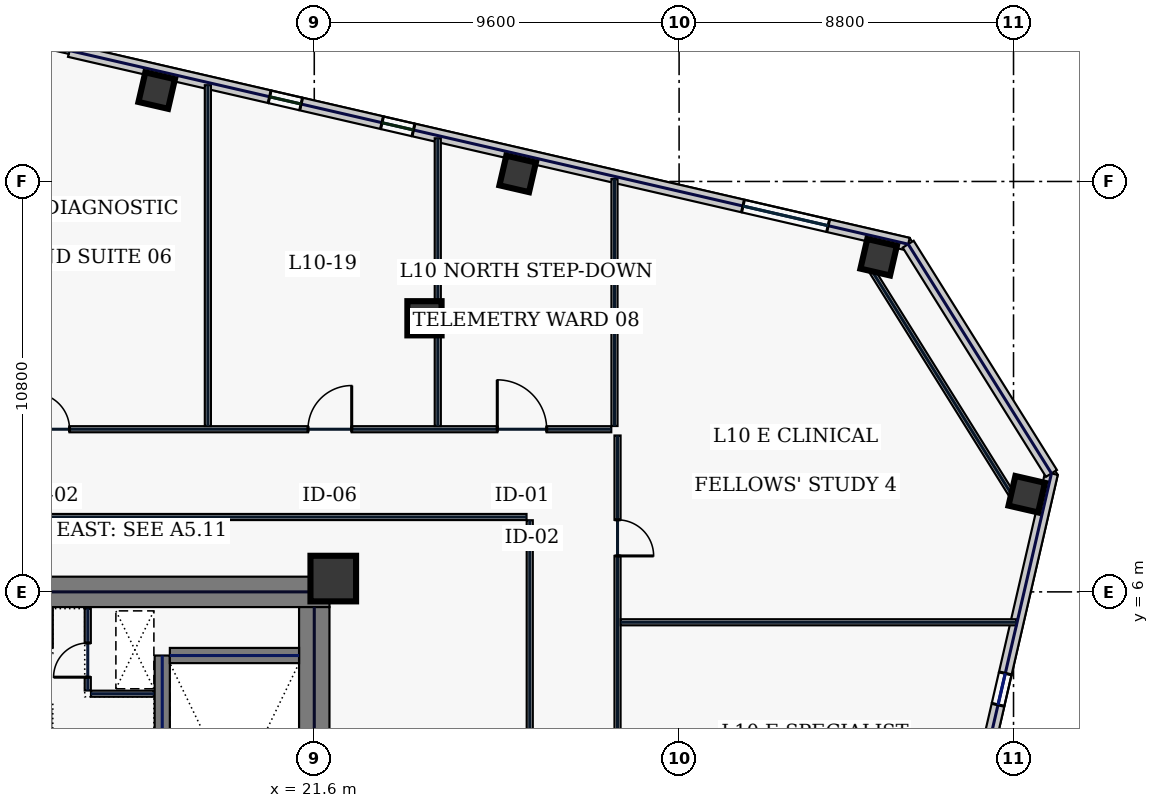
"""IFC4 building model, lengths in metres.
Left out: names, types, materials, properties, quantities, classifications, styles, units other than length and angle.
Written with IfcOpenShell. Run it as: python <this file> out.ifc"""

import sys

from ifc_helpers import new_model, si_unit, direction, frame, frame_2d, origin, origin_2d, place, context, subcontext, project, spatial, rectangle, hollow_rectangle, extrude, element, fill, save


model = new_model("IFC4")
c1 = context("Model", 3, precision=1e-05, world=origin(), true_north=direction((0.0, 1.0)))
c2 = subcontext(c1, "Body", "Model", "MODEL_VIEW")
j1 = project(units=[si_unit("LENGTHUNIT", "METRE"), si_unit("PLANEANGLEUNIT", "RADIAN")], contexts=[c1])
p1 = place(None, origin())
s1 = spatial("IfcSite", under=j1, at=p1, CompositionType="ELEMENT")
p2 = place(p1, origin())
s2 = spatial("IfcBuilding", under=s1, at=p2, CompositionType="ELEMENT")
p3 = place(p2, frame((0.0, 0.0, 51.4)))
s3 = spatial("IfcBuildingStorey", under=s2, at=p3, CompositionType="ELEMENT", Elevation=51.4)
p4 = place(p3, frame((10.4, 6.0, 0.0), z_axis=(0.0, 0.0, 1.0), x_axis=(1.0, 0.0, 0.0)))
e1 = element("IfcWall", 1, at=p4, inside=s3, PredefinedType="SHEAR", context=c2, shape_type="SweptSolid", body=[
    extrude(rectangle(XDim=11.6, YDim=0.8, at=frame_2d((5.8, 0.0))), origin(), (0.0, 0.0, 1.0), 3.74),
])
p5 = place(p3, frame((21.6, -5.6, 0.0), z_axis=(0.0, 0.0, 1.0), x_axis=(0.0, 1.0, 0.0)))
e2 = element("IfcWall", 2, at=p5, inside=s3, PredefinedType="SHEAR", context=c2, shape_type="SweptSolid", body=[
    extrude(rectangle(XDim=11.2, YDim=0.8, at=frame_2d((5.6, 0.0))), origin(), (0.0, 0.0, 1.0), 3.74),
])
p6 = place(p3, frame((17.6, -4.325, 0.0), z_axis=(0.0, 0.0, 1.0), x_axis=(0.0, 1.0, 0.0)))
e3 = element("IfcWall", 3, at=p6, inside=s3, PredefinedType="SHEAR", context=c2, shape_type="SweptSolid", body=[
    extrude(rectangle(XDim=8.65, YDim=0.4, at=frame_2d((4.325, 0.0))), origin(), (0.0, 0.0, 1.0), 3.74),
])
p7 = place(p6, frame((0.25, 0.0, 0.0)))
e4 = element("IfcOpeningElement", 4, at=p7, cuts=e3, PredefinedType="OPENING", context=c2, shape_type="SweptSolid", body=[
    extrude(rectangle(XDim=1.1, YDim=2.2, at=frame_2d((0.55, 1.1))), frame((0.0, 0.21, 0.0), z_axis=(0.0, -1.0, 0.0), x_axis=(1.0, 0.0, 0.0)), (0.0, 0.0, 1.0), 0.42),
])
p8 = place(p3, frame((17.8, 4.325, 0.0), z_axis=(0.0, 0.0, 1.0), x_axis=(1.0, 0.0, 0.0)))
e5 = element("IfcWall", 5, at=p8, inside=s3, PredefinedType="SHEAR", context=c2, shape_type="SweptSolid", body=[
    extrude(rectangle(XDim=3.4, YDim=0.4, at=frame_2d((1.7, 0.0))), origin(), (0.0, 0.0, 1.0), 3.74),
])
p9 = place(p3, frame((22.1, 6.35, 0.0), z_axis=(0.0, 0.0, 1.0), x_axis=(1.0, 0.0, 0.0)))
e6 = element("IfcColumn", 6, at=p9, inside=s3, PredefinedType="COLUMN", context=c2, shape_type="SweptSolid", body=[
    extrude(hollow_rectangle(XDim=1.2, YDim=1.2, WallThickness=0.05, at=origin_2d()), origin(), (0.0, 0.0, 1.0), 3.74),
])
p10 = place(p3, frame((24.5, 13.2, 0.0), z_axis=(0.0, 0.0, 1.0), x_axis=(1.0, 0.0, 0.0)))
e7 = element("IfcColumn", 7, at=p10, inside=s3, PredefinedType="COLUMN", context=c2, shape_type="SweptSolid", body=[
    extrude(hollow_rectangle(XDim=0.9, YDim=0.9, WallThickness=0.04, at=origin_2d()), origin(), (0.0, 0.0, 1.0), 3.74),
])
for number, where, z_axis, x_axis in (
    (8, (36.451, 14.806, 0.0), (0.0, 0.0, 1.0), (0.974, -0.225, 0.0)),
    (9, (26.952, 16.999, 0.0), (0.0, 0.0, 1.0), (0.974, -0.225, 0.0)),
    (10, (17.454, 19.192, 0.0), (0.0, 0.0, 1.0), (0.974, -0.225, 0.0)),
    (11, (40.348, 8.57, 0.0), (0.0, 0.0, 1.0), (0.974, -0.225, 0.0)),
):
    element("IfcColumn", number, at=place(p3, frame(where, z_axis=z_axis, x_axis=x_axis)), inside=s3, PredefinedType="COLUMN", context=c2, shape_type="SweptSolid", body=[
        extrude(hollow_rectangle(XDim=0.8, YDim=0.8, WallThickness=0.036, at=origin_2d()), origin(), (0.0, 0.0, 1.0), 3.74),
    ])
p11 = place(p3, frame((37.229, 15.15, 0.0), z_axis=(0.0, 0.0, 1.0), x_axis=(-0.97436993772, 0.224951604723, 0.0)))
e12 = element("IfcWall", 12, at=p11, inside=s3, PredefinedType="STANDARD", context=c2, shape_type="SweptSolid", body=[
    extrude(rectangle(XDim=22.651, YDim=0.34, at=frame_2d((11.326, 0.0))), origin(), (0.0, 0.0, 1.0), 3.74),
])
p12 = place(p11, frame((16.395, 0.0, 0.77)))
e13 = element("IfcOpeningElement", 13, at=p12, cuts=e12, PredefinedType="OPENING", context=c2, shape_type="SweptSolid", body=[
    extrude(rectangle(XDim=0.85, YDim=1.85, at=frame_2d((0.425, 0.925))), frame((0.0, 0.18, 0.0), z_axis=(0.0, -1.0, 0.0), x_axis=(1.0, 0.0, 0.0)), (0.0, 0.0, 1.0), 0.36),
])
p13 = place(p11, frame((13.361, 0.0, 0.77)))
e14 = element("IfcOpeningElement", 14, at=p13, cuts=e12, PredefinedType="OPENING", context=c2, shape_type="SweptSolid", body=[
    extrude(rectangle(XDim=0.85, YDim=1.85, at=frame_2d((0.425, 0.925))), frame((0.0, 0.18, 0.0), z_axis=(0.0, -1.0, 0.0), x_axis=(1.0, 0.0, 0.0)), (0.0, 0.0, 1.0), 0.36),
])
p14 = place(p11, frame((2.162, 0.0, 0.77)))
e15 = element("IfcOpeningElement", 15, at=p14, cuts=e12, PredefinedType="OPENING", context=c2, shape_type="SweptSolid", body=[
    extrude(rectangle(XDim=2.3, YDim=2.1, at=frame_2d((1.15, 1.05))), frame((0.0, 0.18, 0.0), z_axis=(0.0, -1.0, 0.0), x_axis=(1.0, 0.0, 0.0)), (0.0, 0.0, 1.0), 0.36),
])
p15 = place(p3, frame((31.82, -30.637, 0.0), z_axis=(0.0, 0.0, 1.0), x_axis=(0.224949969076, 0.974370315338, 0.0)))
e16 = element("IfcWall", 16, at=p15, inside=s3, PredefinedType="STANDARD", context=c2, shape_type="SweptSolid", body=[
    extrude(rectangle(XDim=40.8, YDim=0.34, at=frame_2d((20.4, 0.0))), origin(), (0.0, 0.0, 1.0), 3.74),
])
p16 = place(p15, frame((4.3, 0.0, 0.58)))
e17 = element("IfcOpeningElement", 17, at=p16, cuts=e16, PredefinedType="OPENING", context=c2, shape_type="SweptSolid", body=[
    extrude(rectangle(XDim=1.6, YDim=2.3, at=frame_2d((0.8, 1.15))), frame((0.0, 0.18, 0.0), z_axis=(0.0, -1.0, 0.0), x_axis=(1.0, 0.0, 0.0)), (0.0, 0.0, 1.0), 0.36),
])
p17 = place(p15, frame((14.5, 0.0, 0.58)))
e18 = element("IfcOpeningElement", 18, at=p17, cuts=e16, PredefinedType="OPENING", context=c2, shape_type="SweptSolid", body=[
    extrude(rectangle(XDim=1.6, YDim=2.3, at=frame_2d((0.8, 1.15))), frame((0.0, 0.18, 0.0), z_axis=(0.0, -1.0, 0.0), x_axis=(1.0, 0.0, 0.0)), (0.0, 0.0, 1.0), 0.36),
])
p18 = place(p15, frame((24.35, 0.0, 0.75)))
e19 = element("IfcOpeningElement", 19, at=p18, cuts=e16, PredefinedType="OPENING", context=c2, shape_type="SweptSolid", body=[
    extrude(rectangle(XDim=0.85, YDim=1.85, at=frame_2d((0.425, 0.925))), frame((0.0, 0.18, 0.0), z_axis=(0.0, -1.0, 0.0), x_axis=(1.0, 0.0, 0.0)), (0.0, 0.0, 1.0), 0.36),
])
p19 = place(p15, frame((34.55, 0.0, 0.75)))
e20 = element("IfcOpeningElement", 20, at=p19, cuts=e16, PredefinedType="OPENING", context=c2, shape_type="SweptSolid", body=[
    extrude(rectangle(XDim=0.85, YDim=1.85, at=frame_2d((0.425, 0.925))), frame((0.0, 0.18, 0.0), z_axis=(0.0, -1.0, 0.0), x_axis=(1.0, 0.0, 0.0)), (0.0, 0.0, 1.0), 0.36),
])
p20 = place(p3, frame((40.998, 9.117, 0.0), z_axis=(0.0, 0.0, 1.0), x_axis=(-0.529921811158, 0.848046504656, 0.0)))
e21 = element("IfcWall", 21, at=p20, inside=s3, PredefinedType="STANDARD", context=c2, shape_type="SweptSolid", body=[
    extrude(rectangle(XDim=7.113, YDim=0.34, at=frame_2d((3.557, 0.0))), origin(), (0.0, 0.0, 1.0), 3.74),
])
p21 = place(p3, frame((15.64, 3.405, 0.0), z_axis=(0.0, 0.0, 1.0), x_axis=(0.0, 1.0, 0.0)))
e22 = element("IfcWall", 22, at=p21, inside=s3, PredefinedType="PARTITIONING", context=c2, shape_type="SweptSolid", body=[
    extrude(rectangle(XDim=2.155, YDim=0.16, at=frame_2d((1.078, 0.0))), origin(), (0.0, 0.0, 1.0), 3.74),
])
p22 = place(p21, frame((0.35, 0.0, 0.0)))
e23 = element("IfcOpeningElement", 23, at=p22, cuts=e22, PredefinedType="OPENING", context=c2, shape_type="SweptSolid", body=[
    extrude(rectangle(XDim=0.9, YDim=2.2, at=frame_2d((0.45, 1.1))), frame((0.0, 0.09, 0.0), z_axis=(0.0, -1.0, 0.0), x_axis=(1.0, 0.0, 0.0)), (0.0, 0.0, 1.0), 0.18),
])
p23 = place(p3, frame((15.725, 3.32, 0.0), z_axis=(0.0, 0.0, 1.0), x_axis=(1.0, 0.0, 0.0)))
e24 = element("IfcWall", 24, at=p23, inside=s3, PredefinedType="PARTITIONING", context=c2, shape_type="SweptSolid", body=[
    extrude(rectangle(XDim=1.655, YDim=0.16, at=frame_2d((0.827, 0.0))), origin(), (0.0, 0.0, 1.0), 3.74),
])
p24 = place(p3, frame((40.06, 8.389, 0.0), z_axis=(0.0, 0.0, 1.0), x_axis=(-0.529927317139, 0.848043064089, 0.0)))
e25 = element("IfcWall", 25, at=p24, inside=s3, PredefinedType="PARTITIONING", context=c2, shape_type="SweptSolid", body=[
    extrude(rectangle(XDim=7.354, YDim=0.16, at=frame_2d((3.677, 0.0))), origin(), (0.0, 0.0, 1.0), 3.74),
])
p25 = place(p3, frame((-29.415, 10.28, 0.0), z_axis=(0.0, 0.0, 1.0), x_axis=(1.0, 0.0, 0.0)))
e26 = element("IfcWall", 26, at=p25, inside=s3, PredefinedType="PARTITIONING", context=c2, shape_type="SweptSolid", body=[
    extrude(rectangle(XDim=58.83, YDim=0.16, at=frame_2d((29.415, 0.0))), origin(), (0.0, 0.0, 1.0), 3.74),
])
p26 = place(p25, frame((1.869, 0.0, 0.0)))
e27 = element("IfcOpeningElement", 27, at=p26, cuts=e26, PredefinedType="OPENING", context=c2, shape_type="SweptSolid", body=[
    extrude(rectangle(XDim=1.3, YDim=2.2, at=frame_2d((0.65, 1.1))), frame((0.0, 0.09, 0.0), z_axis=(0.0, -1.0, 0.0), x_axis=(1.0, 0.0, 0.0)), (0.0, 0.0, 1.0), 0.18),
])
p27 = place(p25, frame((6.897, 0.0, 0.0)))
e28 = element("IfcOpeningElement", 28, at=p27, cuts=e26, PredefinedType="OPENING", context=c2, shape_type="SweptSolid", body=[
    extrude(rectangle(XDim=1.3, YDim=2.2, at=frame_2d((0.65, 1.1))), frame((0.0, 0.09, 0.0), z_axis=(0.0, -1.0, 0.0), x_axis=(1.0, 0.0, 0.0)), (0.0, 0.0, 1.0), 0.18),
])
p28 = place(p25, frame((12.417, 0.0, 0.0)))
e29 = element("IfcOpeningElement", 29, at=p28, cuts=e26, PredefinedType="OPENING", context=c2, shape_type="SweptSolid", body=[
    extrude(rectangle(XDim=0.95, YDim=2.2, at=frame_2d((0.475, 1.1))), frame((0.0, 0.09, 0.0), z_axis=(0.0, -1.0, 0.0), x_axis=(1.0, 0.0, 0.0)), (0.0, 0.0, 1.0), 0.18),
])
p29 = place(p25, frame((18.545, 0.0, 0.0)))
e30 = element("IfcOpeningElement", 30, at=p29, cuts=e26, PredefinedType="OPENING", context=c2, shape_type="SweptSolid", body=[
    extrude(rectangle(XDim=0.95, YDim=2.2, at=frame_2d((0.475, 1.1))), frame((0.0, 0.09, 0.0), z_axis=(0.0, -1.0, 0.0), x_axis=(1.0, 0.0, 0.0)), (0.0, 0.0, 1.0), 0.18),
])
p30 = place(p25, frame((26.35, 0.0, 0.0)))
e31 = element("IfcOpeningElement", 31, at=p30, cuts=e26, PredefinedType="OPENING", context=c2, shape_type="SweptSolid", body=[
    extrude(rectangle(XDim=1.3, YDim=2.2, at=frame_2d((0.65, 1.1))), frame((0.0, 0.09, 0.0), z_axis=(0.0, -1.0, 0.0), x_axis=(1.0, 0.0, 0.0)), (0.0, 0.0, 1.0), 0.18),
])
p31 = place(p25, frame((35.125, 0.0, 0.0)))
e32 = element("IfcOpeningElement", 32, at=p31, cuts=e26, PredefinedType="OPENING", context=c2, shape_type="SweptSolid", body=[
    extrude(rectangle(XDim=0.95, YDim=2.2, at=frame_2d((0.475, 1.1))), frame((0.0, 0.09, 0.0), z_axis=(0.0, -1.0, 0.0), x_axis=(1.0, 0.0, 0.0)), (0.0, 0.0, 1.0), 0.18),
])
p32 = place(p25, frame((43.625, 0.0, 0.0)))
e33 = element("IfcOpeningElement", 33, at=p32, cuts=e26, PredefinedType="OPENING", context=c2, shape_type="SweptSolid", body=[
    extrude(rectangle(XDim=0.95, YDim=2.2, at=frame_2d((0.475, 1.1))), frame((0.0, 0.09, 0.0), z_axis=(0.0, -1.0, 0.0), x_axis=(1.0, 0.0, 0.0)), (0.0, 0.0, 1.0), 0.18),
])
p33 = place(p25, frame((50.85, 0.0, 0.0)))
e34 = element("IfcOpeningElement", 34, at=p33, cuts=e26, PredefinedType="OPENING", context=c2, shape_type="SweptSolid", body=[
    extrude(rectangle(XDim=1.15, YDim=2.2, at=frame_2d((0.575, 1.1))), frame((0.0, 0.09, 0.0), z_axis=(0.0, -1.0, 0.0), x_axis=(1.0, 0.0, 0.0)), (0.0, 0.0, 1.0), 0.18),
])
p34 = place(p25, frame((55.831, 0.0, 0.0)))
e35 = element("IfcOpeningElement", 35, at=p34, cuts=e26, PredefinedType="OPENING", context=c2, shape_type="SweptSolid", body=[
    extrude(rectangle(XDim=1.3, YDim=2.2, at=frame_2d((0.65, 1.1))), frame((0.0, 0.09, 0.0), z_axis=(0.0, -1.0, 0.0), x_axis=(1.0, 0.0, 0.0)), (0.0, 0.0, 1.0), 0.18),
])
p35 = place(p3, frame((29.58, 10.115, 0.0), z_axis=(0.0, 0.0, 1.0), x_axis=(0.0, -1.0, 0.0)))
e36 = element("IfcWall", 36, at=p35, inside=s3, PredefinedType="PARTITIONING", context=c2, shape_type="SweptSolid", body=[
    extrude(rectangle(XDim=20.13, YDim=0.16, at=frame_2d((10.065, 0.0))), origin(), (0.0, 0.0, 1.0), 3.74),
])
p36 = place(p35, frame((17.181, 0.0, 0.0)))
e37 = element("IfcOpeningElement", 37, at=p36, cuts=e36, PredefinedType="OPENING", context=c2, shape_type="SweptSolid", body=[
    extrude(rectangle(XDim=0.95, YDim=2.2, at=frame_2d((0.475, 1.1))), frame((0.0, 0.09, 0.0), z_axis=(0.0, -1.0, 0.0), x_axis=(1.0, 0.0, 0.0)), (0.0, 0.0, 1.0), 0.18),
])
p37 = place(p35, frame((12.95, 0.0, 0.0)))
e38 = element("IfcOpeningElement", 38, at=p37, cuts=e36, PredefinedType="OPENING", context=c2, shape_type="SweptSolid", body=[
    extrude(rectangle(XDim=0.95, YDim=2.2, at=frame_2d((0.475, 1.1))), frame((0.0, 0.09, 0.0), z_axis=(0.0, -1.0, 0.0), x_axis=(1.0, 0.0, 0.0)), (0.0, 0.0, 1.0), 0.18),
])
p38 = place(p35, frame((7.75, 0.0, 0.0)))
e39 = element("IfcOpeningElement", 39, at=p38, cuts=e36, PredefinedType="OPENING", context=c2, shape_type="SweptSolid", body=[
    extrude(rectangle(XDim=0.95, YDim=2.2, at=frame_2d((0.475, 1.1))), frame((0.0, 0.09, 0.0), z_axis=(0.0, -1.0, 0.0), x_axis=(1.0, 0.0, 0.0)), (0.0, 0.0, 1.0), 0.18),
])
p39 = place(p35, frame((2.219, 0.0, 0.0)))
e40 = element("IfcOpeningElement", 40, at=p39, cuts=e36, PredefinedType="OPENING", context=c2, shape_type="SweptSolid", body=[
    extrude(rectangle(XDim=0.95, YDim=2.2, at=frame_2d((0.475, 1.1))), frame((0.0, 0.09, 0.0), z_axis=(0.0, -1.0, 0.0), x_axis=(1.0, 0.0, 0.0)), (0.0, 0.0, 1.0), 0.18),
])
p40 = place(p3, frame((27.185, 7.97, 0.0), z_axis=(0.0, 0.0, 1.0), x_axis=(-1.0, 0.0, 0.0)))
e41 = element("IfcWall", 41, at=p40, inside=s3, PredefinedType="PARTITIONING", context=c2, shape_type="SweptSolid", body=[
    extrude(rectangle(XDim=16.52, YDim=0.16, at=frame_2d((8.26, 0.0))), origin(), (0.0, 0.0, 1.0), 3.74),
])
p41 = place(p3, frame((27.27, -7.785, 0.0), z_axis=(0.0, 0.0, 1.0), x_axis=(0.0, 1.0, 0.0)))
e42 = element("IfcWall", 42, at=p41, inside=s3, PredefinedType="PARTITIONING", context=c2, shape_type="SweptSolid", body=[
    extrude(rectangle(XDim=15.67, YDim=0.16, at=frame_2d((7.835, 0.0))), origin(), (0.0, 0.0, 1.0), 3.74),
])
p42 = place(p3, frame((29.5, 10.365, 0.0), z_axis=(0.0, 0.0, 1.0), x_axis=(0.0, 1.0, 0.0)))
e43 = element("IfcWall", 43, at=p42, inside=s3, PredefinedType="PARTITIONING", context=c2, shape_type="SweptSolid", body=[
    extrude(rectangle(XDim=6.497, YDim=0.16, at=frame_2d((3.249, 0.0))), origin(), (0.0, 0.0, 1.0), 3.74),
])
p43 = place(p3, frame((18.8, 10.365, 0.0), z_axis=(0.0, 0.0, 1.0), x_axis=(0.0, 1.0, 0.0)))
e44 = element("IfcWall", 44, at=p43, inside=s3, PredefinedType="PARTITIONING", context=c2, shape_type="SweptSolid", body=[
    extrude(rectangle(XDim=8.968, YDim=0.16, at=frame_2d((4.484, 0.0))), origin(), (0.0, 0.0, 1.0), 3.74),
])
p44 = place(p3, frame((24.85, 10.365, 0.0), z_axis=(0.0, 0.0, 1.0), x_axis=(0.0, 1.0, 0.0)))
e45 = element("IfcWall", 45, at=p44, inside=s3, PredefinedType="PARTITIONING", context=c2, shape_type="SweptSolid", body=[
    extrude(rectangle(XDim=7.571, YDim=0.16, at=frame_2d((3.785, 0.0))), origin(), (0.0, 0.0, 1.0), 3.74),
])
p45 = place(p3, frame((29.665, 5.2, 0.0), z_axis=(0.0, 0.0, 1.0), x_axis=(1.0, 0.0, 0.0)))
e46 = element("IfcWall", 46, at=p45, inside=s3, PredefinedType="PARTITIONING", context=c2, shape_type="SweptSolid", body=[
    extrude(rectangle(XDim=10.408, YDim=0.16, at=frame_2d((5.204, 0.0))), origin(), (0.0, 0.0, 1.0), 3.74),
])
p46 = place(p12, origin())
e47 = element("IfcWindow", 47, at=p46, inside=s3, PartitioningType="SINGLE_PANEL", PredefinedType="WINDOW", context=c2, shape_type="SweptSolid", body=[
    extrude(rectangle(XDim=0.85, YDim=1.85, at=frame_2d((0.425, 0.925))), frame((0.0, 0.03, 0.0), z_axis=(0.0, -1.0, 0.0), x_axis=(1.0, 0.0, 0.0)), (0.0, 0.0, 1.0), 0.06),
])
fill(e13, e47)
p47 = place(p13, origin())
e48 = element("IfcWindow", 48, at=p47, inside=s3, PartitioningType="SINGLE_PANEL", PredefinedType="WINDOW", context=c2, shape_type="SweptSolid", body=[
    extrude(rectangle(XDim=0.85, YDim=1.85, at=frame_2d((0.425, 0.925))), frame((0.0, 0.03, 0.0), z_axis=(0.0, -1.0, 0.0), x_axis=(1.0, 0.0, 0.0)), (0.0, 0.0, 1.0), 0.06),
])
fill(e14, e48)
p48 = place(p14, origin())
e49 = element("IfcWindow", 49, at=p48, inside=s3, PartitioningType="SINGLE_PANEL", PredefinedType="WINDOW", context=c2, shape_type="SweptSolid", body=[
    extrude(rectangle(XDim=2.3, YDim=2.1, at=frame_2d((1.15, 1.05))), frame((0.0, 0.03, 0.0), z_axis=(0.0, -1.0, 0.0), x_axis=(1.0, 0.0, 0.0)), (0.0, 0.0, 1.0), 0.06),
])
fill(e15, e49)
p49 = place(p19, origin())
e50 = element("IfcWindow", 50, at=p49, inside=s3, PartitioningType="SINGLE_PANEL", PredefinedType="WINDOW", context=c2, shape_type="SweptSolid", body=[
    extrude(rectangle(XDim=0.85, YDim=1.85, at=frame_2d((0.425, 0.925))), frame((0.0, 0.03, 0.0), z_axis=(0.0, -1.0, 0.0), x_axis=(1.0, 0.0, 0.0)), (0.0, 0.0, 1.0), 0.06),
])
fill(e20, e50)
p50 = place(p22, origin())
e51 = element("IfcDoor", 51, at=p50, inside=s3, OperationType="SINGLE_SWING_LEFT", PredefinedType="DOOR", context=c2, shape_type="SweptSolid", body=[
    extrude(rectangle(XDim=0.9, YDim=2.2, at=frame_2d((0.45, 1.1))), frame((0.0, 0.025, 0.0), z_axis=(0.0, -1.0, 0.0), x_axis=(1.0, 0.0, 0.0)), (0.0, 0.0, 1.0), 0.05),
])
fill(e23, e51)
p51 = place(p32, origin())
e52 = element("IfcDoor", 52, at=p51, inside=s3, OperationType="SINGLE_SWING_LEFT", PredefinedType="DOOR", context=c2, shape_type="SweptSolid", body=[
    extrude(rectangle(XDim=0.95, YDim=2.2, at=frame_2d((0.475, 1.1))), frame((0.0, 0.025, 0.0), z_axis=(0.0, -1.0, 0.0), x_axis=(1.0, 0.0, 0.0)), (0.0, 0.0, 1.0), 0.05),
])
fill(e33, e52)
p52 = place(p33, origin())
e53 = element("IfcDoor", 53, at=p52, inside=s3, OperationType="SINGLE_SWING_RIGHT", PredefinedType="DOOR", context=c2, shape_type="SweptSolid", body=[
    extrude(rectangle(XDim=1.15, YDim=2.2, at=frame_2d((0.575, 1.1))), frame((0.0, 0.025, 0.0), z_axis=(0.0, -1.0, 0.0), x_axis=(1.0, 0.0, 0.0)), (0.0, 0.0, 1.0), 0.05),
])
fill(e34, e53)
p53 = place(p34, origin())
e54 = element("IfcDoor", 54, at=p53, inside=s3, OperationType="SINGLE_SWING_LEFT", PredefinedType="DOOR", context=c2, shape_type="SweptSolid", body=[
    extrude(rectangle(XDim=1.3, YDim=2.2, at=frame_2d((0.65, 1.1))), frame((0.0, 0.025, 0.0), z_axis=(0.0, -1.0, 0.0), x_axis=(1.0, 0.0, 0.0)), (0.0, 0.0, 1.0), 0.05),
])
fill(e35, e54)
p54 = place(p39, origin())
e55 = element("IfcDoor", 55, at=p54, inside=s3, OperationType="SINGLE_SWING_RIGHT", PredefinedType="DOOR", context=c2, shape_type="SweptSolid", body=[
    extrude(rectangle(XDim=0.95, YDim=2.2, at=frame_2d((0.475, 1.1))), frame((0.0, 0.025, 0.0), z_axis=(0.0, -1.0, 0.0), x_axis=(1.0, 0.0, 0.0)), (0.0, 0.0, 1.0), 0.05),
])
fill(e40, e55)
save(model, sys.argv[1])
